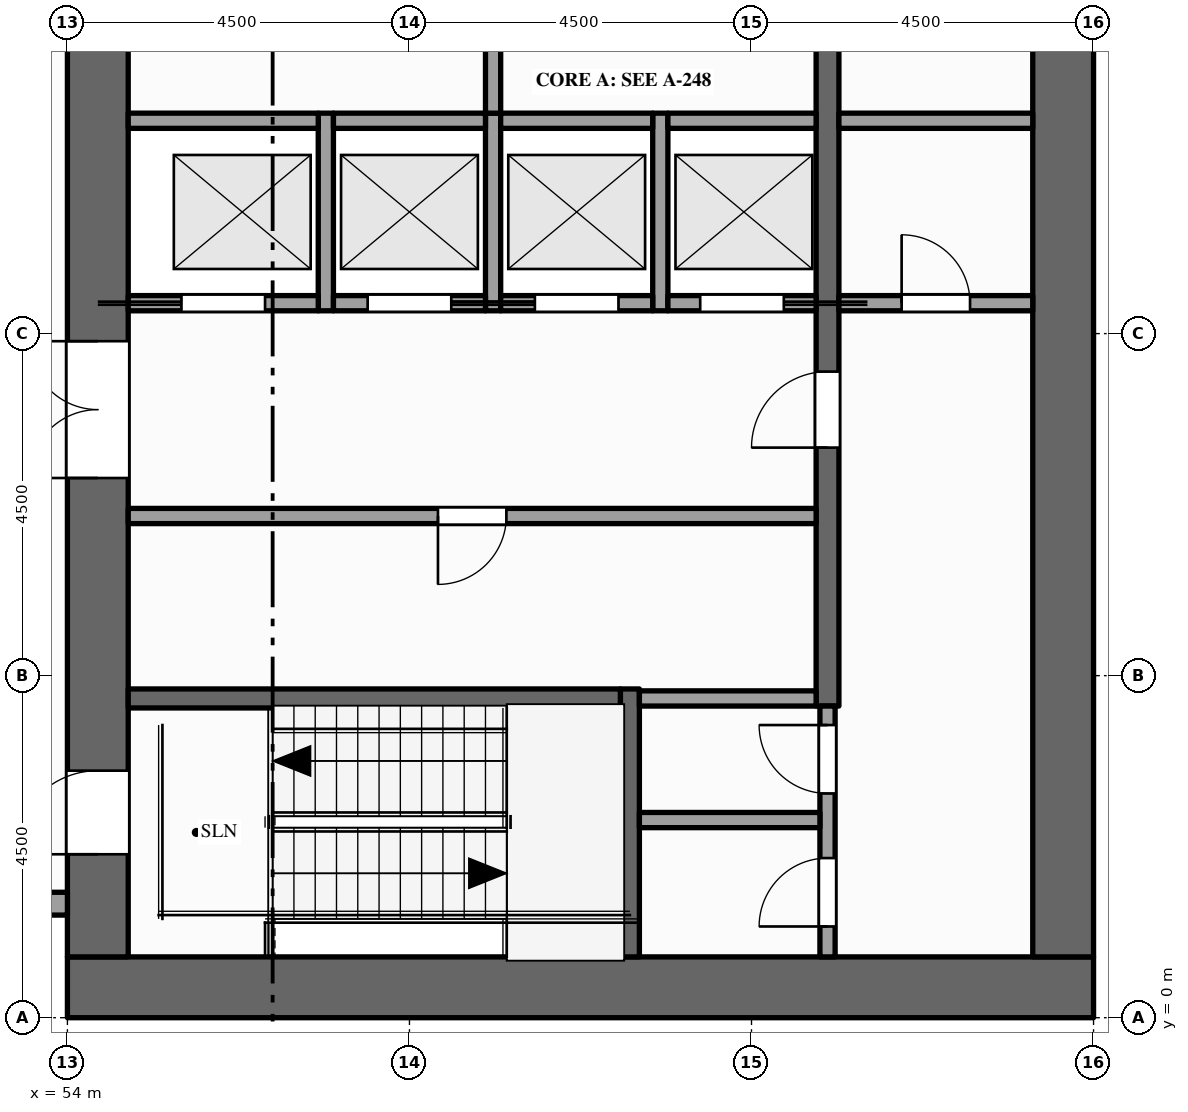
"""IFC4 building model, lengths in metres.
Left out: names, types, materials, properties, quantities, classifications, styles, units other than length and angle.
Written with IfcOpenShell. Run it as: python <this file> out.ifc"""

import sys

from ifc_helpers import new_model, si_unit, direction, frame, frame_2d, origin, place, context, subcontext, project, spatial, rectangle, extrude, element, fill, save


model = new_model("IFC4")
c1 = context("Model", 3, precision=1e-05, world=origin(), true_north=direction((0.0, 1.0)))
c2 = subcontext(c1, "Body", "Model", "MODEL_VIEW")
j1 = project(units=[si_unit("LENGTHUNIT", "METRE"), si_unit("PLANEANGLEUNIT", "RADIAN")], contexts=[c1])
p1 = place(None, origin())
s1 = spatial("IfcSite", under=j1, at=p1, CompositionType="ELEMENT")
p2 = place(p1, origin())
s2 = spatial("IfcBuilding", under=s1, at=p2, CompositionType="ELEMENT")
p3 = place(p2, frame((0.0, 0.0, 273.0)))
s3 = spatial("IfcBuildingStorey", under=s2, at=p3, CompositionType="ELEMENT", Elevation=273.0)
p4 = place(p3, frame((67.5, 0.4, -0.15), z_axis=(0.0, 0.0, 1.0), x_axis=(-1.0, 0.0, 0.0)))
e1 = element("IfcWall", 1, at=p4, inside=s3, PredefinedType="SHEAR", context=c2, shape_type="SweptSolid", body=[
    extrude(rectangle(XDim=13.5, YDim=0.8, at=frame_2d((6.75, 0.0))), origin(), (0.0, 0.0, 1.0), 4.0),
])
p5 = place(p3, frame((54.4, 0.8, -0.15), z_axis=(0.0, 0.0, 1.0), x_axis=(0.0, 1.0, 0.0)))
e2 = element("IfcWall", 2, at=p5, inside=s3, PredefinedType="SHEAR", context=c2, shape_type="SweptSolid", body=[
    extrude(rectangle(XDim=20.9, YDim=0.8, at=frame_2d((10.45, 0.0))), origin(), (0.0, 0.0, 1.0), 4.0),
])
p6 = place(p5, frame((6.3, 0.0, 0.15)))
e3 = element("IfcOpeningElement", 3, at=p6, cuts=e2, PredefinedType="OPENING", context=c2, shape_type="SweptSolid", body=[
    extrude(rectangle(XDim=1.8, YDim=2.1, at=frame_2d((0.9, 1.05))), frame((0.0, 0.41, 0.0), z_axis=(0.0, -1.0, 0.0), x_axis=(1.0, 0.0, 0.0)), (0.0, 0.0, 1.0), 0.82),
])
p7 = place(p5, frame((12.35, 0.0, 0.15)))
e4 = element("IfcOpeningElement", 4, at=p7, cuts=e2, PredefinedType="OPENING", context=c2, shape_type="SweptSolid", body=[
    extrude(rectangle(XDim=1.1, YDim=2.1, at=frame_2d((0.55, 1.05))), frame((0.0, 0.41, 0.0), z_axis=(0.0, -1.0, 0.0), x_axis=(1.0, 0.0, 0.0)), (0.0, 0.0, 1.0), 0.82),
])
p8 = place(p5, frame((1.35, 0.0, 0.15)))
e5 = element("IfcOpeningElement", 5, at=p8, cuts=e2, PredefinedType="OPENING", context=c2, shape_type="SweptSolid", body=[
    extrude(rectangle(XDim=1.1, YDim=2.1, at=frame_2d((0.55, 1.05))), frame((0.0, 0.41, 0.0), z_axis=(0.0, -1.0, 0.0), x_axis=(1.0, 0.0, 0.0)), (0.0, 0.0, 1.0), 0.82),
])
p9 = place(p5, frame((18.55, 0.0, 0.15)))
e6 = element("IfcOpeningElement", 6, at=p9, cuts=e2, PredefinedType="OPENING", context=c2, shape_type="SweptSolid", body=[
    extrude(rectangle(XDim=1.1, YDim=2.1, at=frame_2d((0.55, 1.05))), frame((0.0, 0.41, 0.0), z_axis=(0.0, -1.0, 0.0), x_axis=(1.0, 0.0, 0.0)), (0.0, 0.0, 1.0), 0.82),
])
p10 = place(p3, frame((67.1, 0.8, -0.15), z_axis=(0.0, 0.0, 1.0), x_axis=(0.0, 1.0, 0.0)))
e7 = element("IfcWall", 7, at=p10, inside=s3, PredefinedType="SHEAR", context=c2, shape_type="SweptSolid", body=[
    extrude(rectangle(XDim=20.9, YDim=0.8, at=frame_2d((10.45, 0.0))), origin(), (0.0, 0.0, 1.0), 4.0),
])
p11 = place(p3, frame((49.825, 1.5, 0.0), z_axis=(0.0, 0.0, 1.0), x_axis=(1.0, 0.0, 0.0)))
e8 = element("IfcWall", 8, at=p11, inside=s3, PredefinedType="STANDARD", context=c2, shape_type="SweptSolid", body=[
    extrude(rectangle(XDim=4.175, YDim=0.3, at=frame_2d((2.087, 0.0))), origin(), (0.0, 0.0, 1.0), 2.87),
])
p12 = place(p11, frame((0.413, 0.0, 0.9)))
e9 = element("IfcOpeningElement", 9, at=p12, cuts=e8, PredefinedType="OPENING", context=c2, shape_type="SweptSolid", body=[
    extrude(rectangle(XDim=1.2, YDim=1.75, at=frame_2d((0.6, 0.875))), frame((0.0, 0.16, 0.0), z_axis=(0.0, -1.0, 0.0), x_axis=(1.0, 0.0, 0.0)), (0.0, 0.0, 1.0), 0.32),
])
p13 = place(p11, frame((2.225, 0.0, 0.9)))
e10 = element("IfcOpeningElement", 10, at=p13, cuts=e8, PredefinedType="OPENING", context=c2, shape_type="SweptSolid", body=[
    extrude(rectangle(XDim=1.55, YDim=1.75, at=frame_2d((0.775, 0.875))), frame((0.0, 0.16, 0.0), z_axis=(0.0, -1.0, 0.0), x_axis=(1.0, 0.0, 0.0)), (0.0, 0.0, 1.0), 0.32),
])
for number, where, z_axis, x_axis in (
    (11, (57.4, 9.3, 0.0), (0.0, 0.0, 1.0), (0.0, 1.0, 0.0)),
    (12, (59.6, 9.3, 0.0), (0.0, 0.0, 1.0), (0.0, 1.0, 0.0)),
):
    element("IfcWall", number, at=place(p3, frame(where, z_axis=z_axis, x_axis=x_axis)), inside=s3, PredefinedType="SOLIDWALL", context=c2, shape_type="SweptSolid", body=[
        extrude(rectangle(XDim=2.6, YDim=0.2, at=frame_2d((1.3, 0.0))), origin(), (0.0, 0.0, 1.0), 3.85),
    ])
p14 = place(p3, frame((59.6, 11.9, 0.0), z_axis=(0.0, 0.0, 1.0), x_axis=(0.0, 1.0, 0.0)))
e13 = element("IfcWall", 13, at=p14, inside=s3, PredefinedType="PARTITIONING", context=c2, shape_type="SweptSolid", body=[
    extrude(rectangle(XDim=3.6, YDim=0.2, at=frame_2d((1.8, 0.0))), origin(), (0.0, 0.0, 1.0), 3.85),
])
p15 = place(p14, frame((1.3, 0.0, 0.0)))
e14 = element("IfcOpeningElement", 14, at=p15, cuts=e13, PredefinedType="OPENING", context=c2, shape_type="SweptSolid", body=[
    extrude(rectangle(XDim=1.0, YDim=2.1, at=frame_2d((0.5, 1.05))), frame((0.0, 0.11, 0.0), z_axis=(0.0, -1.0, 0.0), x_axis=(1.0, 0.0, 0.0)), (0.0, 0.0, 1.0), 0.22),
])
p16 = place(p3, frame((61.4, 0.8, 0.0), z_axis=(0.0, 0.0, 1.0), x_axis=(0.0, 1.0, 0.0)))
e15 = element("IfcWall", 15, at=p16, inside=s3, PredefinedType="SHEAR", context=c2, shape_type="SweptSolid", body=[
    extrude(rectangle(XDim=3.525, YDim=0.25, at=frame_2d((1.762, 0.0))), origin(), (0.0, 0.0, 1.0), 3.85),
])
p17 = place(p3, frame((61.8, 9.3, 0.0), z_axis=(0.0, 0.0, 1.0), x_axis=(0.0, 1.0, 0.0)))
e16 = element("IfcWall", 16, at=p17, inside=s3, PredefinedType="SOLIDWALL", context=c2, shape_type="SweptSolid", body=[
    extrude(rectangle(XDim=2.6, YDim=0.2, at=frame_2d((1.3, 0.0))), origin(), (0.0, 0.0, 1.0), 3.85),
])
p18 = place(p3, frame((64.0, 0.8, 0.0), z_axis=(0.0, 0.0, 1.0), x_axis=(0.0, 1.0, 0.0)))
e17 = element("IfcWall", 17, at=p18, inside=s3, PredefinedType="PARTITIONING", context=c2, shape_type="SweptSolid", body=[
    extrude(rectangle(XDim=3.3, YDim=0.2, at=frame_2d((1.65, 0.0))), origin(), (0.0, 0.0, 1.0), 3.85),
])
p19 = place(p18, frame((0.4, 0.0, 0.0)))
e18 = element("IfcOpeningElement", 18, at=p19, cuts=e17, PredefinedType="OPENING", context=c2, shape_type="SweptSolid", body=[
    extrude(rectangle(XDim=0.9, YDim=2.1, at=frame_2d((0.45, 1.05))), frame((0.0, 0.11, 0.0), z_axis=(0.0, -1.0, 0.0), x_axis=(1.0, 0.0, 0.0)), (0.0, 0.0, 1.0), 0.22),
])
p20 = place(p18, frame((2.15, 0.0, 0.0)))
e19 = element("IfcOpeningElement", 19, at=p20, cuts=e17, PredefinedType="OPENING", context=c2, shape_type="SweptSolid", body=[
    extrude(rectangle(XDim=0.9, YDim=2.1, at=frame_2d((0.45, 1.05))), frame((0.0, 0.11, 0.0), z_axis=(0.0, -1.0, 0.0), x_axis=(1.0, 0.0, 0.0)), (0.0, 0.0, 1.0), 0.22),
])
p21 = place(p3, frame((64.0, 4.1, 0.0), z_axis=(0.0, 0.0, 1.0), x_axis=(0.0, 1.0, 0.0)))
e20 = element("IfcWall", 20, at=p21, inside=s3, PredefinedType="SHEAR", context=c2, shape_type="SweptSolid", body=[
    extrude(rectangle(XDim=14.5, YDim=0.3, at=frame_2d((7.25, 0.0))), origin(), (0.0, 0.0, 1.0), 3.85),
])
p22 = place(p21, frame((3.4, 0.0, 0.0)))
e21 = element("IfcOpeningElement", 21, at=p22, cuts=e20, PredefinedType="OPENING", context=c2, shape_type="SweptSolid", body=[
    extrude(rectangle(XDim=1.0, YDim=2.1, at=frame_2d((0.5, 1.05))), frame((0.0, 0.16, 0.0), z_axis=(0.0, -1.0, 0.0), x_axis=(1.0, 0.0, 0.0)), (0.0, 0.0, 1.0), 0.32),
])
p23 = place(p21, frame((9.1, 0.0, 0.0)))
e22 = element("IfcOpeningElement", 22, at=p23, cuts=e20, PredefinedType="OPENING", context=c2, shape_type="SweptSolid", body=[
    extrude(rectangle(XDim=1.0, YDim=2.1, at=frame_2d((0.5, 1.05))), frame((0.0, 0.16, 0.0), z_axis=(0.0, -1.0, 0.0), x_axis=(1.0, 0.0, 0.0)), (0.0, 0.0, 1.0), 0.32),
])
p24 = place(p3, frame((61.525, 2.6, 0.0), z_axis=(0.0, 0.0, 1.0), x_axis=(1.0, 0.0, 0.0)))
e23 = element("IfcWall", 23, at=p24, inside=s3, PredefinedType="PARTITIONING", context=c2, shape_type="SweptSolid", body=[
    extrude(rectangle(XDim=2.375, YDim=0.2, at=frame_2d((1.188, 0.0))), origin(), (0.0, 0.0, 1.0), 3.85),
])
p25 = place(p3, frame((54.8, 4.2, 0.0), z_axis=(0.0, 0.0, 1.0), x_axis=(1.0, 0.0, 0.0)))
e24 = element("IfcWall", 24, at=p25, inside=s3, PredefinedType="SHEAR", context=c2, shape_type="SweptSolid", body=[
    extrude(rectangle(XDim=6.475, YDim=0.25, at=frame_2d((3.237, 0.0))), origin(), (0.0, 0.0, 1.0), 3.85),
])
p26 = place(p3, frame((61.525, 4.2, 0.0), z_axis=(0.0, 0.0, 1.0), x_axis=(1.0, 0.0, 0.0)))
e25 = element("IfcWall", 25, at=p26, inside=s3, PredefinedType="PARTITIONING", context=c2, shape_type="SweptSolid", body=[
    extrude(rectangle(XDim=2.325, YDim=0.2, at=frame_2d((1.163, 0.0))), origin(), (0.0, 0.0, 1.0), 3.85),
])
p27 = place(p3, frame((54.8, 6.6, 0.0), z_axis=(0.0, 0.0, 1.0), x_axis=(1.0, 0.0, 0.0)))
e26 = element("IfcWall", 26, at=p27, inside=s3, PredefinedType="PARTITIONING", context=c2, shape_type="SweptSolid", body=[
    extrude(rectangle(XDim=9.05, YDim=0.2, at=frame_2d((4.525, 0.0))), origin(), (0.0, 0.0, 1.0), 3.85),
])
p28 = place(p27, frame((4.075, 0.0, 0.0)))
e27 = element("IfcOpeningElement", 27, at=p28, cuts=e26, PredefinedType="OPENING", context=c2, shape_type="SweptSolid", body=[
    extrude(rectangle(XDim=0.9, YDim=2.1, at=frame_2d((0.45, 1.05))), frame((0.0, 0.11, 0.0), z_axis=(0.0, -1.0, 0.0), x_axis=(1.0, 0.0, 0.0)), (0.0, 0.0, 1.0), 0.22),
])
p29 = place(p3, frame((54.8, 9.4, 0.0), z_axis=(0.0, 0.0, 1.0), x_axis=(1.0, 0.0, 0.0)))
e28 = element("IfcWall", 28, at=p29, inside=s3, PredefinedType="SOLIDWALL", context=c2, shape_type="SweptSolid", body=[
    extrude(rectangle(XDim=2.5, YDim=0.2, at=frame_2d((1.25, 0.0))), origin(), (0.0, 0.0, 1.0), 3.85),
])
p30 = place(p29, frame((0.7, 0.0, 0.012)))
e29 = element("IfcOpeningElement", 29, at=p30, cuts=e28, PredefinedType="OPENING", context=c2, shape_type="SweptSolid", body=[
    extrude(rectangle(XDim=1.1, YDim=2.1, at=frame_2d((0.55, 1.05))), frame((0.0, 0.11, 0.0), z_axis=(0.0, -1.0, 0.0), x_axis=(1.0, 0.0, 0.0)), (0.0, 0.0, 1.0), 0.22),
])
p31 = place(p3, frame((57.5, 9.4, 0.0), z_axis=(0.0, 0.0, 1.0), x_axis=(1.0, 0.0, 0.0)))
e30 = element("IfcWall", 30, at=p31, inside=s3, PredefinedType="SOLIDWALL", context=c2, shape_type="SweptSolid", body=[
    extrude(rectangle(XDim=2.0, YDim=0.2, at=frame_2d((1.0, 0.0))), origin(), (0.0, 0.0, 1.0), 3.85),
])
p32 = place(p31, frame((0.45, 0.0, 0.012)))
e31 = element("IfcOpeningElement", 31, at=p32, cuts=e30, PredefinedType="OPENING", context=c2, shape_type="SweptSolid", body=[
    extrude(rectangle(XDim=1.1, YDim=2.1, at=frame_2d((0.55, 1.05))), frame((0.0, 0.11, 0.0), z_axis=(0.0, -1.0, 0.0), x_axis=(1.0, 0.0, 0.0)), (0.0, 0.0, 1.0), 0.22),
])
p33 = place(p3, frame((59.7, 9.4, 0.0), z_axis=(0.0, 0.0, 1.0), x_axis=(1.0, 0.0, 0.0)))
e32 = element("IfcWall", 32, at=p33, inside=s3, PredefinedType="SOLIDWALL", context=c2, shape_type="SweptSolid", body=[
    extrude(rectangle(XDim=2.0, YDim=0.2, at=frame_2d((1.0, 0.0))), origin(), (0.0, 0.0, 1.0), 3.85),
])
p34 = place(p33, frame((0.45, 0.0, 0.012)))
e33 = element("IfcOpeningElement", 33, at=p34, cuts=e32, PredefinedType="OPENING", context=c2, shape_type="SweptSolid", body=[
    extrude(rectangle(XDim=1.1, YDim=2.1, at=frame_2d((0.55, 1.05))), frame((0.0, 0.11, 0.0), z_axis=(0.0, -1.0, 0.0), x_axis=(1.0, 0.0, 0.0)), (0.0, 0.0, 1.0), 0.22),
])
p35 = place(p3, frame((61.9, 9.4, 0.0), z_axis=(0.0, 0.0, 1.0), x_axis=(1.0, 0.0, 0.0)))
e34 = element("IfcWall", 34, at=p35, inside=s3, PredefinedType="SOLIDWALL", context=c2, shape_type="SweptSolid", body=[
    extrude(rectangle(XDim=1.95, YDim=0.2, at=frame_2d((0.975, 0.0))), origin(), (0.0, 0.0, 1.0), 3.85),
])
p36 = place(p35, frame((0.425, 0.0, 0.012)))
e35 = element("IfcOpeningElement", 35, at=p36, cuts=e34, PredefinedType="OPENING", context=c2, shape_type="SweptSolid", body=[
    extrude(rectangle(XDim=1.1, YDim=2.1, at=frame_2d((0.55, 1.05))), frame((0.0, 0.11, 0.0), z_axis=(0.0, -1.0, 0.0), x_axis=(1.0, 0.0, 0.0)), (0.0, 0.0, 1.0), 0.22),
])
p37 = place(p3, frame((64.15, 9.4, 0.0), z_axis=(0.0, 0.0, 1.0), x_axis=(1.0, 0.0, 0.0)))
e36 = element("IfcWall", 36, at=p37, inside=s3, PredefinedType="PARTITIONING", context=c2, shape_type="SweptSolid", body=[
    extrude(rectangle(XDim=2.55, YDim=0.2, at=frame_2d((1.275, 0.0))), origin(), (0.0, 0.0, 1.0), 3.85),
])
p38 = place(p37, frame((0.825, 0.0, 0.0)))
e37 = element("IfcOpeningElement", 37, at=p38, cuts=e36, PredefinedType="OPENING", context=c2, shape_type="SweptSolid", body=[
    extrude(rectangle(XDim=0.9, YDim=2.1, at=frame_2d((0.45, 1.05))), frame((0.0, 0.11, 0.0), z_axis=(0.0, -1.0, 0.0), x_axis=(1.0, 0.0, 0.0)), (0.0, 0.0, 1.0), 0.22),
])
p39 = place(p3, frame((54.8, 11.8, 0.0), z_axis=(0.0, 0.0, 1.0), x_axis=(1.0, 0.0, 0.0)))
e38 = element("IfcWall", 38, at=p39, inside=s3, PredefinedType="SOLIDWALL", context=c2, shape_type="SweptSolid", body=[
    extrude(rectangle(XDim=2.5, YDim=0.2, at=frame_2d((1.25, 0.0))), origin(), (0.0, 0.0, 1.0), 3.85),
])
for number, where, z_axis, x_axis in (
    (39, (57.5, 11.8, 0.0), (0.0, 0.0, 1.0), (1.0, 0.0, 0.0)),
    (40, (59.7, 11.8, 0.0), (0.0, 0.0, 1.0), (1.0, 0.0, 0.0)),
):
    element("IfcWall", number, at=place(p3, frame(where, z_axis=z_axis, x_axis=x_axis)), inside=s3, PredefinedType="SOLIDWALL", context=c2, shape_type="SweptSolid", body=[
        extrude(rectangle(XDim=2.0, YDim=0.2, at=frame_2d((1.0, 0.0))), origin(), (0.0, 0.0, 1.0), 3.85),
    ])
p40 = place(p3, frame((61.9, 11.8, 0.0), z_axis=(0.0, 0.0, 1.0), x_axis=(1.0, 0.0, 0.0)))
e41 = element("IfcWall", 41, at=p40, inside=s3, PredefinedType="SOLIDWALL", context=c2, shape_type="SweptSolid", body=[
    extrude(rectangle(XDim=1.95, YDim=0.2, at=frame_2d((0.975, 0.0))), origin(), (0.0, 0.0, 1.0), 3.85),
])
p41 = place(p3, frame((64.15, 11.8, 0.0), z_axis=(0.0, 0.0, 1.0), x_axis=(1.0, 0.0, 0.0)))
e42 = element("IfcWall", 42, at=p41, inside=s3, PredefinedType="PARTITIONING", context=c2, shape_type="SweptSolid", body=[
    extrude(rectangle(XDim=2.55, YDim=0.2, at=frame_2d((1.275, 0.0))), origin(), (0.0, 0.0, 1.0), 3.85),
])
p42 = place(p30, origin())
e43 = element("IfcDoor", 43, at=p42, inside=s3, OperationType="SLIDING_TO_LEFT", PredefinedType="DOOR", context=c2, shape_type="SweptSolid", body=[
    extrude(rectangle(XDim=1.1, YDim=2.1, at=frame_2d((0.55, 1.05))), frame((0.0, 0.025, 0.0), z_axis=(0.0, -1.0, 0.0), x_axis=(1.0, 0.0, 0.0)), (0.0, 0.0, 1.0), 0.05),
])
fill(e29, e43)
p43 = place(p32, origin())
e44 = element("IfcDoor", 44, at=p43, inside=s3, OperationType="SLIDING_TO_RIGHT", PredefinedType="DOOR", context=c2, shape_type="SweptSolid", body=[
    extrude(rectangle(XDim=1.1, YDim=2.1, at=frame_2d((0.55, 1.05))), frame((0.0, 0.025, 0.0), z_axis=(0.0, -1.0, 0.0), x_axis=(1.0, 0.0, 0.0)), (0.0, 0.0, 1.0), 0.05),
])
fill(e31, e44)
p44 = place(p34, origin())
e45 = element("IfcDoor", 45, at=p44, inside=s3, OperationType="SLIDING_TO_LEFT", PredefinedType="DOOR", context=c2, shape_type="SweptSolid", body=[
    extrude(rectangle(XDim=1.1, YDim=2.1, at=frame_2d((0.55, 1.05))), frame((0.0, 0.025, 0.0), z_axis=(0.0, -1.0, 0.0), x_axis=(1.0, 0.0, 0.0)), (0.0, 0.0, 1.0), 0.05),
])
fill(e33, e45)
p45 = place(p36, origin())
e46 = element("IfcDoor", 46, at=p45, inside=s3, OperationType="SLIDING_TO_RIGHT", PredefinedType="DOOR", context=c2, shape_type="SweptSolid", body=[
    extrude(rectangle(XDim=1.1, YDim=2.1, at=frame_2d((0.55, 1.05))), frame((0.0, 0.025, 0.0), z_axis=(0.0, -1.0, 0.0), x_axis=(1.0, 0.0, 0.0)), (0.0, 0.0, 1.0), 0.05),
])
fill(e35, e46)
p46 = place(p6, origin())
e47 = element("IfcDoor", 47, at=p46, inside=s3, OperationType="DOUBLE_DOOR_SINGLE_SWING", PredefinedType="DOOR", context=c2, shape_type="SweptSolid", body=[
    extrude(rectangle(XDim=1.8, YDim=2.1, at=frame_2d((0.9, 1.05))), frame((0.0, 0.025, 0.0), z_axis=(0.0, -1.0, 0.0), x_axis=(1.0, 0.0, 0.0)), (0.0, 0.0, 1.0), 0.05),
])
fill(e3, e47)
p47 = place(p22, origin())
e48 = element("IfcDoor", 48, at=p47, inside=s3, OperationType="SINGLE_SWING_LEFT", PredefinedType="DOOR", context=c2, shape_type="SweptSolid", body=[
    extrude(rectangle(XDim=1.0, YDim=2.1, at=frame_2d((0.5, 1.05))), frame((0.0, 0.025, 0.0), z_axis=(0.0, -1.0, 0.0), x_axis=(1.0, 0.0, 0.0)), (0.0, 0.0, 1.0), 0.05),
])
fill(e21, e48)
p48 = place(p38, origin())
e49 = element("IfcDoor", 49, at=p48, inside=s3, OperationType="SINGLE_SWING_LEFT", PredefinedType="DOOR", context=c2, shape_type="SweptSolid", body=[
    extrude(rectangle(XDim=0.9, YDim=2.1, at=frame_2d((0.45, 1.05))), frame((0.0, 0.025, 0.0), z_axis=(0.0, -1.0, 0.0), x_axis=(1.0, 0.0, 0.0)), (0.0, 0.0, 1.0), 0.05),
])
fill(e37, e49)
p49 = place(p8, origin())
e50 = element("IfcDoor", 50, at=p49, inside=s3, OperationType="SINGLE_SWING_LEFT", PredefinedType="DOOR", context=c2, shape_type="SweptSolid", body=[
    extrude(rectangle(XDim=1.1, YDim=2.1, at=frame_2d((0.55, 1.05))), frame((0.0, 0.025, 0.0), z_axis=(0.0, -1.0, 0.0), x_axis=(1.0, 0.0, 0.0)), (0.0, 0.0, 1.0), 0.05),
])
fill(e5, e50)
p50 = place(p19, origin())
e51 = element("IfcDoor", 51, at=p50, inside=s3, OperationType="SINGLE_SWING_LEFT", PredefinedType="DOOR", context=c2, shape_type="SweptSolid", body=[
    extrude(rectangle(XDim=0.9, YDim=2.1, at=frame_2d((0.45, 1.05))), frame((0.0, 0.025, 0.0), z_axis=(0.0, -1.0, 0.0), x_axis=(1.0, 0.0, 0.0)), (0.0, 0.0, 1.0), 0.05),
])
fill(e18, e51)
p51 = place(p20, origin())
e52 = element("IfcDoor", 52, at=p51, inside=s3, OperationType="SINGLE_SWING_RIGHT", PredefinedType="DOOR", context=c2, shape_type="SweptSolid", body=[
    extrude(rectangle(XDim=0.9, YDim=2.1, at=frame_2d((0.45, 1.05))), frame((0.0, 0.025, 0.0), z_axis=(0.0, -1.0, 0.0), x_axis=(1.0, 0.0, 0.0)), (0.0, 0.0, 1.0), 0.05),
])
fill(e19, e52)
p52 = place(p28, origin())
e53 = element("IfcDoor", 53, at=p52, inside=s3, OperationType="SINGLE_SWING_LEFT", PredefinedType="DOOR", context=c2, shape_type="SweptSolid", body=[
    extrude(rectangle(XDim=0.9, YDim=2.1, at=frame_2d((0.45, 1.05))), frame((0.0, 0.025, 0.0), z_axis=(0.0, -1.0, 0.0), x_axis=(1.0, 0.0, 0.0)), (0.0, 0.0, 1.0), 0.05),
])
fill(e27, e53)
save(model, sys.argv[1])
